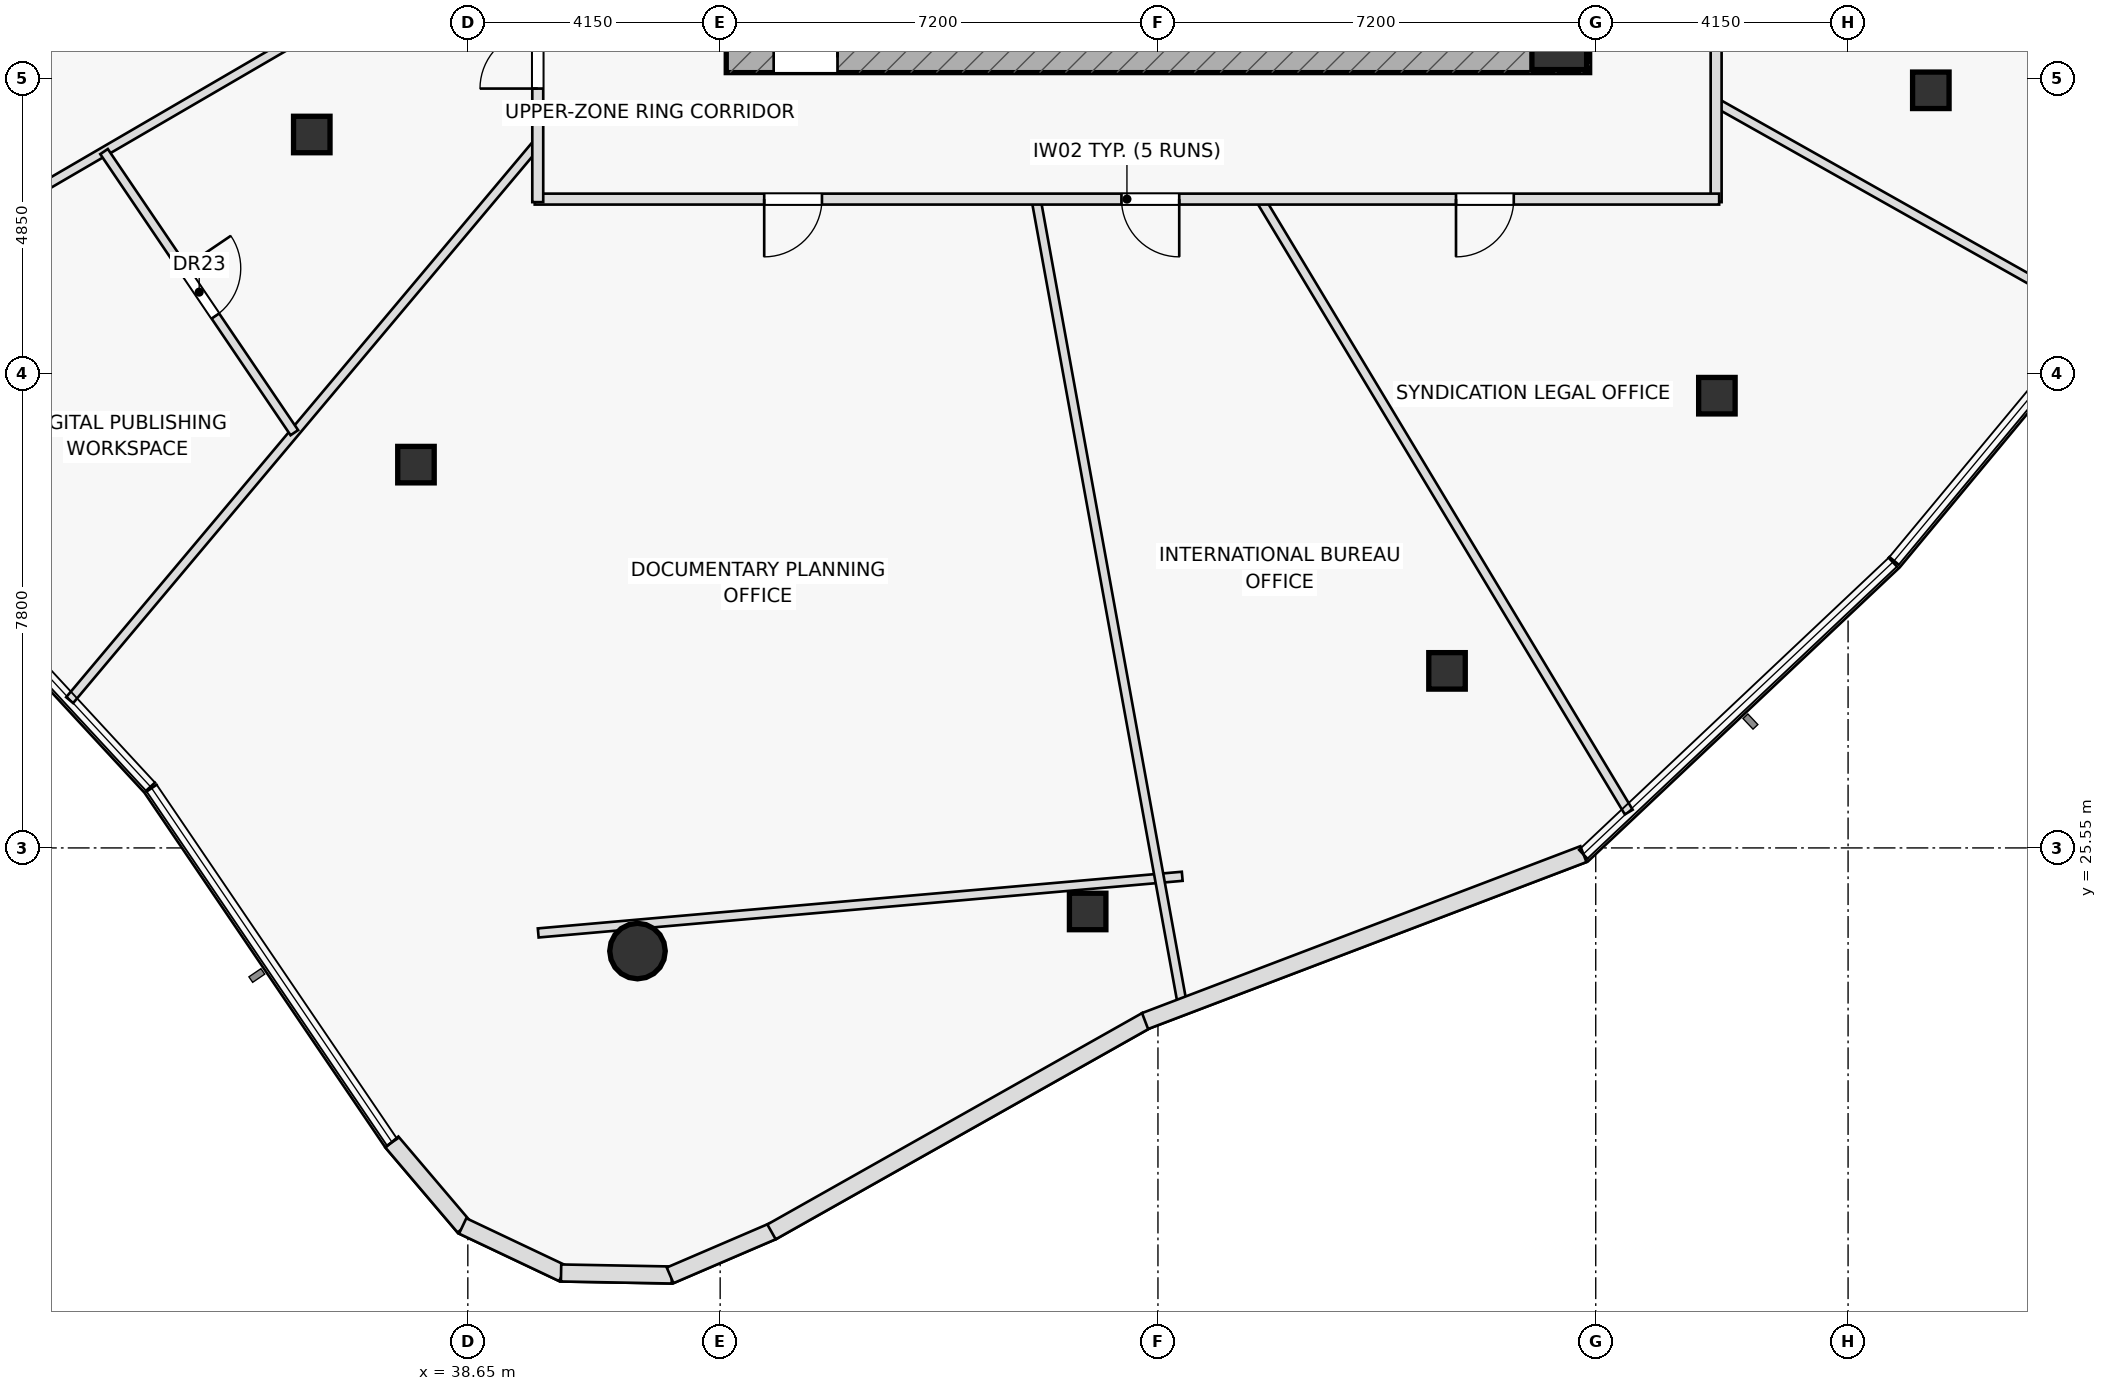
"""IFC4 building model, lengths in metres.
Left out: names, types, materials, properties, quantities, classifications, styles, units other than length and angle.
Written with IfcOpenShell. Run it as: python <this file> out.ifc"""

import sys

from ifc_helpers import new_model, si_unit, direction, frame, frame_2d, origin, origin_2d, place, context, subcontext, project, spatial, rectangle, hollow_rectangle, hollow_circle, extrude, element, fill, save


model = new_model("IFC4")
c1 = context("Model", 3, precision=1e-05, world=origin(), true_north=direction((0.0, 1.0)))
c2 = subcontext(c1, "Body", "Model", "MODEL_VIEW")
j1 = project(units=[si_unit("LENGTHUNIT", "METRE"), si_unit("PLANEANGLEUNIT", "RADIAN")], contexts=[c1])
p1 = place(None, origin())
s1 = spatial("IfcSite", under=j1, at=p1, CompositionType="ELEMENT")
p2 = place(p1, origin())
s2 = spatial("IfcBuilding", under=s1, at=p2, CompositionType="ELEMENT")
p3 = place(p2, frame((0.0, 0.0, 237.95)))
s3 = spatial("IfcBuildingStorey", under=s2, at=p3, CompositionType="ELEMENT", Elevation=237.95)
p4 = place(p3, frame((42.9, 38.55, 0.0), z_axis=(0.0, 0.0, 1.0), x_axis=(1.0, 0.0, 0.0)))
e1 = element("IfcWall", 1, at=p4, inside=s3, PredefinedType="SHEAR", context=c2, shape_type="SweptSolid", body=[
    extrude(rectangle(XDim=14.2, YDim=0.5, at=frame_2d((7.1, 0.0))), origin(), (0.0, 0.0, 1.0), 3.65),
])
p5 = place(p4, frame((0.78, 0.0, 0.0)))
e2 = element("IfcOpeningElement", 2, at=p5, cuts=e1, PredefinedType="OPENING", context=c2, shape_type="SweptSolid", body=[
    extrude(rectangle(XDim=1.05, YDim=2.2, at=frame_2d((0.525, 1.1))), frame((0.0, 0.26, 0.0), z_axis=(0.0, -1.0, 0.0), x_axis=(1.0, 0.0, 0.0)), (0.0, 0.0, 1.0), 0.52),
])
p6 = place(p3, frame((56.6, 38.8, 0.0), z_axis=(0.0, 0.0, 1.0), x_axis=(1.0, 0.0, 0.0)))
e3 = element("IfcColumn", 3, at=p6, inside=s3, PredefinedType="COLUMN", context=c2, shape_type="SweptSolid", body=[
    extrude(rectangle(XDim=0.9, YDim=0.9, at=origin_2d()), origin(), (0.0, 0.0, 1.0), 3.65),
])
for number, where, z_axis, x_axis in (
    (4, (36.083, 37.282, 0.0), (0.0, 0.0, 1.0), (1.0, 0.0, 0.0)),
    (5, (37.797, 31.853, 0.0), (0.0, 0.0, 1.0), (1.0, 0.0, 0.0)),
):
    element("IfcColumn", number, at=place(p3, frame(where, z_axis=z_axis, x_axis=x_axis)), inside=s3, PredefinedType="COLUMN", context=c2, shape_type="SweptSolid", body=[
        extrude(hollow_rectangle(XDim=0.6, YDim=0.6, WallThickness=0.036, at=origin_2d()), origin(), (0.0, 0.0, 1.0), 3.65),
    ])
p7 = place(p3, frame((41.44, 23.854, 0.0), z_axis=(0.0, 0.0, 1.0), x_axis=(1.0, 0.0, 0.0)))
e6 = element("IfcColumn", 6, at=p7, inside=s3, PredefinedType="COLUMN", context=c2, shape_type="SweptSolid", body=[
    extrude(hollow_circle(Radius=0.457, WallThickness=0.04, at=origin_2d()), origin(), (0.0, 0.0, 1.0), 3.65),
])
for number, where, z_axis, x_axis in (
    (7, (48.844, 24.505, 0.0), (0.0, 0.0, 1.0), (1.0, 0.0, 0.0)),
    (8, (54.754, 28.462, 0.0), (0.0, 0.0, 1.0), (1.0, 0.0, 0.0)),
    (9, (59.192, 32.987, 0.0), (0.0, 0.0, 1.0), (1.0, 0.0, 0.0)),
    (10, (62.711, 38.009, 0.0), (0.0, 0.0, 1.0), (1.0, 0.0, 0.0)),
):
    element("IfcColumn", number, at=place(p3, frame(where, z_axis=z_axis, x_axis=x_axis)), inside=s3, PredefinedType="COLUMN", context=c2, shape_type="SweptSolid", body=[
        extrude(hollow_rectangle(XDim=0.6, YDim=0.6, WallThickness=0.036, at=origin_2d()), origin(), (0.0, 0.0, 1.0), 3.65),
    ])
p8 = place(p3, frame((39.808, 24.152, 0.0), z_axis=(0.0, 0.0, 1.0), x_axis=(0.996153584085, 0.087624408208, 0.0)))
e11 = element("IfcWall", 11, at=p8, inside=s3, PredefinedType="PARTITIONING", context=c2, shape_type="SweptSolid", body=[
    extrude(rectangle(XDim=10.632, YDim=0.15, at=frame_2d((5.316, 0.0))), origin(), (0.0, 0.0, 1.0), 3.135),
])
p9 = place(p3, frame((38.227, 40.24, 0.0), z_axis=(0.0, 0.0, 1.0), x_axis=(-0.864126503229, -0.503274662999, 0.0)))
e12 = element("IfcWall", 12, at=p9, inside=s3, PredefinedType="PARTITIONING", context=c2, shape_type="SweptSolid", body=[
    extrude(rectangle(XDim=12.373, YDim=0.15, at=frame_2d((6.187, 0.0))), origin(), (0.0, 0.0, 1.0), 3.135),
])
p10 = place(p3, frame((39.8, 37.144, 0.0), z_axis=(0.0, 0.0, 1.0), x_axis=(-0.64325714608, -0.765650209963, 0.0)))
e13 = element("IfcWall", 13, at=p10, inside=s3, PredefinedType="PARTITIONING", context=c2, shape_type="SweptSolid", body=[
    extrude(rectangle(XDim=11.968, YDim=0.15, at=frame_2d((5.984, 0.0))), origin(), (0.0, 0.0, 1.0), 3.135),
])
p11 = place(p3, frame((47.995, 36.22, 0.0), z_axis=(0.0, 0.0, 1.0), x_axis=(0.178745476332, -0.983895347428, 0.0)))
e14 = element("IfcWall", 14, at=p11, inside=s3, PredefinedType="PARTITIONING", context=c2, shape_type="SweptSolid", body=[
    extrude(rectangle(XDim=13.508, YDim=0.15, at=frame_2d((6.754, 0.0))), origin(), (0.0, 0.0, 1.0), 3.135),
])
p12 = place(p3, frame((51.68, 36.22, 0.0), z_axis=(0.0, 0.0, 1.0), x_axis=(0.515395849716, -0.856952226262, 0.0)))
e15 = element("IfcWall", 15, at=p12, inside=s3, PredefinedType="PARTITIONING", context=c2, shape_type="SweptSolid", body=[
    extrude(rectangle(XDim=11.763, YDim=0.15, at=frame_2d((5.882, 0.0))), origin(), (0.0, 0.0, 1.0), 3.025),
])
p13 = place(p3, frame((59.18, 37.804, 0.0), z_axis=(0.0, 0.0, 1.0), x_axis=(0.871363325643, -0.490638313551, 0.0)))
e16 = element("IfcWall", 16, at=p13, inside=s3, PredefinedType="PARTITIONING", context=c2, shape_type="SweptSolid", body=[
    extrude(rectangle(XDim=7.192, YDim=0.15, at=frame_2d((3.596, 0.0))), origin(), (0.0, 0.0, 1.0), 3.135),
])
p14 = place(p3, frame((32.667, 37.002, 0.0), z_axis=(0.0, 0.0, 1.0), x_axis=(0.560589941765, -0.828093543745, 0.0)))
e17 = element("IfcWall", 17, at=p14, inside=s3, PredefinedType="PARTITIONING", context=c2, shape_type="SweptSolid", body=[
    extrude(rectangle(XDim=5.583, YDim=0.15, at=frame_2d((2.792, 0.0))), origin(), (0.0, 0.0, 1.0), 3.65),
])
p15 = place(p14, frame((2.316, 0.0, 0.0)))
e18 = element("IfcOpeningElement", 18, at=p15, cuts=e17, PredefinedType="OPENING", context=c2, shape_type="SweptSolid", body=[
    extrude(rectangle(XDim=0.95, YDim=2.05, at=frame_2d((0.475, 1.025))), frame((0.0, 0.085, 0.0), z_axis=(0.0, -1.0, 0.0), x_axis=(1.0, 0.0, 0.0)), (0.0, 0.0, 1.0), 0.17),
])
p16 = place(p3, frame((59.18, 41.1, 0.0), z_axis=(0.0, 0.0, 1.0), x_axis=(0.0, -1.0, 0.0)))
e19 = element("IfcWall", 19, at=p16, inside=s3, PredefinedType="PARTITIONING", context=c2, shape_type="SweptSolid", body=[
    extrude(rectangle(XDim=4.93, YDim=0.18, at=frame_2d((2.465, 0.0))), origin(), (0.0, 0.0, 1.0), 3.325),
])
p17 = place(p16, frame((1.316, 0.0, 0.0)))
e20 = element("IfcOpeningElement", 20, at=p17, cuts=e19, PredefinedType="OPENING", context=c2, shape_type="SweptSolid", body=[
    extrude(rectangle(XDim=0.95, YDim=2.05, at=frame_2d((0.475, 1.025))), frame((0.0, 0.1, 0.0), z_axis=(0.0, -1.0, 0.0), x_axis=(1.0, 0.0, 0.0)), (0.0, 0.0, 1.0), 0.2),
])
p18 = place(p3, frame((59.23, 36.22, 0.0), z_axis=(0.0, 0.0, 1.0), x_axis=(-1.0, 0.0, 0.0)))
e21 = element("IfcWall", 21, at=p18, inside=s3, PredefinedType="PARTITIONING", context=c2, shape_type="SweptSolid", body=[
    extrude(rectangle(XDim=19.48, YDim=0.18, at=frame_2d((9.74, 0.0))), origin(), (0.0, 0.0, 1.0), 3.025),
])
p19 = place(p18, frame((3.378, 0.0, 0.0)))
e22 = element("IfcOpeningElement", 22, at=p19, cuts=e21, PredefinedType="OPENING", context=c2, shape_type="SweptSolid", body=[
    extrude(rectangle(XDim=0.95, YDim=2.05, at=frame_2d((0.475, 1.025))), frame((0.0, 0.1, 0.0), z_axis=(0.0, -1.0, 0.0), x_axis=(1.0, 0.0, 0.0)), (0.0, 0.0, 1.0), 0.2),
])
p20 = place(p18, frame((8.88, 0.0, 0.0)))
e23 = element("IfcOpeningElement", 23, at=p20, cuts=e21, PredefinedType="OPENING", context=c2, shape_type="SweptSolid", body=[
    extrude(rectangle(XDim=0.95, YDim=2.05, at=frame_2d((0.475, 1.025))), frame((0.0, 0.1, 0.0), z_axis=(0.0, -1.0, 0.0), x_axis=(1.0, 0.0, 0.0)), (0.0, 0.0, 1.0), 0.2),
])
p21 = place(p18, frame((14.756, 0.0, 0.0)))
e24 = element("IfcOpeningElement", 24, at=p21, cuts=e21, PredefinedType="OPENING", context=c2, shape_type="SweptSolid", body=[
    extrude(rectangle(XDim=0.95, YDim=2.05, at=frame_2d((0.475, 1.025))), frame((0.0, 0.1, 0.0), z_axis=(0.0, -1.0, 0.0), x_axis=(1.0, 0.0, 0.0)), (0.0, 0.0, 1.0), 0.2),
])
p22 = place(p3, frame((39.8, 36.17, 0.0), z_axis=(0.0, 0.0, 1.0), x_axis=(0.0, 1.0, 0.0)))
e25 = element("IfcWall", 25, at=p22, inside=s3, PredefinedType="PARTITIONING", context=c2, shape_type="SweptSolid", body=[
    extrude(rectangle(XDim=4.08, YDim=0.18, at=frame_2d((2.04, 0.0))), origin(), (0.0, 0.0, 1.0), 3.325),
])
p23 = place(p22, frame((1.868, 0.0, 0.0)))
e26 = element("IfcOpeningElement", 26, at=p23, cuts=e25, PredefinedType="OPENING", context=c2, shape_type="SweptSolid", body=[
    extrude(rectangle(XDim=0.95, YDim=2.05, at=frame_2d((0.475, 1.025))), frame((0.0, 0.1, 0.0), z_axis=(0.0, -1.0, 0.0), x_axis=(1.0, 0.0, 0.0)), (0.0, 0.0, 1.0), 0.2),
])
p24 = place(p3, frame((37.401, 20.713, 0.0), z_axis=(0.0, 0.0, 1.0), x_axis=(0.647528592685, -0.76204115483, 0.0)))
e27 = element("IfcWall", 27, at=p24, inside=s3, PredefinedType="STANDARD", context=c2, shape_type="SweptSolid", body=[
    extrude(rectangle(XDim=1.833, YDim=0.28, at=frame_2d((0.917, 0.0))), origin(), (0.0, 0.0, 1.0), 3.65),
])
p25 = place(p3, frame((38.565, 19.333, 0.0), z_axis=(0.0, 0.0, 1.0), x_axis=(0.903710559641, -0.42814392953, 0.0)))
e28 = element("IfcWall", 28, at=p25, inside=s3, PredefinedType="STANDARD", context=c2, shape_type="SweptSolid", body=[
    extrude(rectangle(XDim=1.823, YDim=0.28, at=frame_2d((0.911, 0.0))), origin(), (0.0, 0.0, 1.0), 3.65),
])
p26 = place(p3, frame((40.184, 18.56, 0.0), z_axis=(0.0, 0.0, 1.0), x_axis=(0.999833953719, -0.018222650456, 0.0)))
e29 = element("IfcWall", 29, at=p26, inside=s3, PredefinedType="STANDARD", context=c2, shape_type="SweptSolid", body=[
    extrude(rectangle(XDim=1.822, YDim=0.28, at=frame_2d((0.911, 0.0))), origin(), (0.0, 0.0, 1.0), 3.65),
])
p27 = place(p3, frame((41.977, 18.521, 0.0), z_axis=(0.0, 0.0, 1.0), x_axis=(0.91883671621, 0.394637921322, 0.0)))
e30 = element("IfcWall", 30, at=p27, inside=s3, PredefinedType="STANDARD", context=c2, shape_type="SweptSolid", body=[
    extrude(rectangle(XDim=1.845, YDim=0.28, at=frame_2d((0.922, 0.0))), origin(), (0.0, 0.0, 1.0), 3.65),
])
p28 = place(p3, frame((43.645, 19.236, 0.0), z_axis=(0.0, 0.0, 1.0), x_axis=(0.871001534269, 0.491280294029, 0.0)))
e31 = element("IfcWall", 31, at=p28, inside=s3, PredefinedType="STANDARD", context=c2, shape_type="SweptSolid", body=[
    extrude(rectangle(XDim=7.084, YDim=0.28, at=frame_2d((3.542, 0.0))), origin(), (0.0, 0.0, 1.0), 3.65),
])
p29 = place(p3, frame((49.788, 22.703, 0.0), z_axis=(0.0, 0.0, 1.0), x_axis=(0.934566925924, 0.355787381688, 0.0)))
e32 = element("IfcWall", 32, at=p29, inside=s3, PredefinedType="STANDARD", context=c2, shape_type="SweptSolid", body=[
    extrude(rectangle(XDim=7.714, YDim=0.28, at=frame_2d((3.857, 0.0))), origin(), (0.0, 0.0, 1.0), 3.65),
])
p30 = place(p5, origin())
e33 = element("IfcDoor", 33, at=p30, inside=s3, OperationType="SINGLE_SWING_RIGHT", PredefinedType="DOOR", context=c2, shape_type="SweptSolid", body=[
    extrude(rectangle(XDim=1.05, YDim=2.2, at=frame_2d((0.525, 1.1))), frame((0.0, 0.025, 0.0), z_axis=(0.0, -1.0, 0.0), x_axis=(1.0, 0.0, 0.0)), (0.0, 0.0, 1.0), 0.05),
])
fill(e2, e33)
p31 = place(p15, origin())
e34 = element("IfcDoor", 34, at=p31, inside=s3, OperationType="SINGLE_SWING_LEFT", PredefinedType="DOOR", context=c2, shape_type="SweptSolid", body=[
    extrude(rectangle(XDim=0.95, YDim=2.05, at=frame_2d((0.475, 1.025))), frame((0.0, 0.025, 0.0), z_axis=(0.0, -1.0, 0.0), x_axis=(1.0, 0.0, 0.0)), (0.0, 0.0, 1.0), 0.05),
])
fill(e18, e34)
p32 = place(p19, origin())
e35 = element("IfcDoor", 35, at=p32, inside=s3, OperationType="SINGLE_SWING_RIGHT", PredefinedType="DOOR", context=c2, shape_type="SweptSolid", body=[
    extrude(rectangle(XDim=0.95, YDim=2.05, at=frame_2d((0.475, 1.025))), frame((0.0, 0.025, 0.0), z_axis=(0.0, -1.0, 0.0), x_axis=(1.0, 0.0, 0.0)), (0.0, 0.0, 1.0), 0.05),
])
fill(e22, e35)
p33 = place(p20, origin())
e36 = element("IfcDoor", 36, at=p33, inside=s3, OperationType="SINGLE_SWING_LEFT", PredefinedType="DOOR", context=c2, shape_type="SweptSolid", body=[
    extrude(rectangle(XDim=0.95, YDim=2.05, at=frame_2d((0.475, 1.025))), frame((0.0, 0.025, 0.0), z_axis=(0.0, -1.0, 0.0), x_axis=(1.0, 0.0, 0.0)), (0.0, 0.0, 1.0), 0.05),
])
fill(e23, e36)
p34 = place(p21, origin())
e37 = element("IfcDoor", 37, at=p34, inside=s3, OperationType="SINGLE_SWING_RIGHT", PredefinedType="DOOR", context=c2, shape_type="SweptSolid", body=[
    extrude(rectangle(XDim=0.95, YDim=2.05, at=frame_2d((0.475, 1.025))), frame((0.0, 0.025, 0.0), z_axis=(0.0, -1.0, 0.0), x_axis=(1.0, 0.0, 0.0)), (0.0, 0.0, 1.0), 0.05),
])
fill(e24, e37)
p35 = place(p23, origin())
e38 = element("IfcDoor", 38, at=p35, inside=s3, OperationType="SINGLE_SWING_LEFT", PredefinedType="DOOR", context=c2, shape_type="SweptSolid", body=[
    extrude(rectangle(XDim=0.95, YDim=2.05, at=frame_2d((0.475, 1.025))), frame((0.0, 0.025, 0.0), z_axis=(0.0, -1.0, 0.0), x_axis=(1.0, 0.0, 0.0)), (0.0, 0.0, 1.0), 0.05),
])
fill(e26, e38)
save(model, sys.argv[1])
